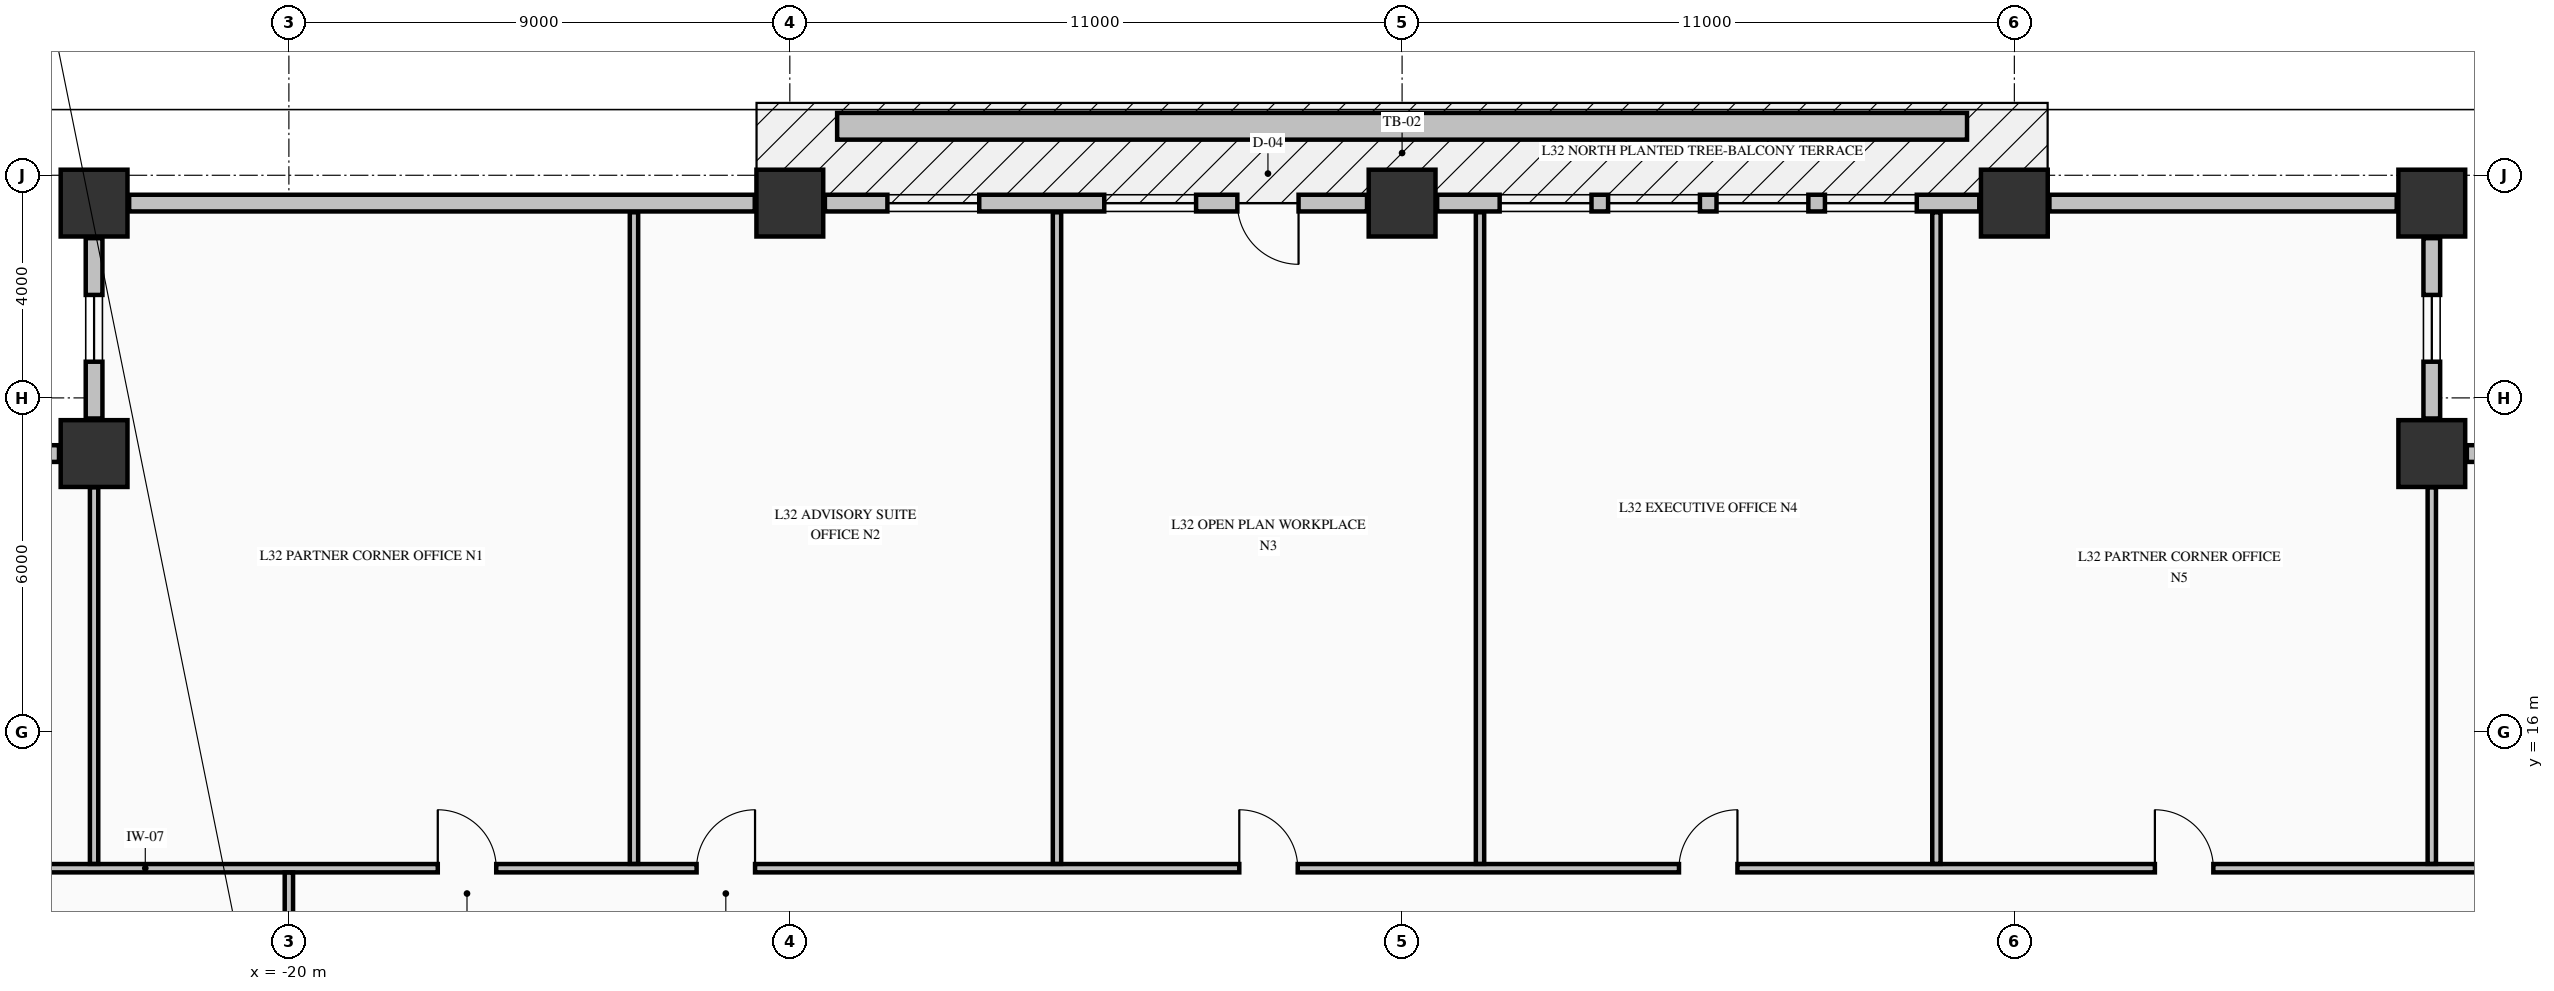
"""IFC4 building model, lengths in metres.
Left out: names, types, materials, properties, quantities, classifications, styles, units other than length and angle.
Written with IfcOpenShell. Run it as: python <this file> out.ifc"""

import sys

from ifc_helpers import new_model, si_unit, direction, frame, frame_2d, origin, origin_2d, place, context, subcontext, project, spatial, rectangle, extrude, element, fill, save


model = new_model("IFC4")
c1 = context("Model", 3, precision=1e-05, world=origin(), true_north=direction((0.0, 1.0)))
c2 = subcontext(c1, "Body", "Model", "MODEL_VIEW")
j1 = project(units=[si_unit("LENGTHUNIT", "METRE"), si_unit("PLANEANGLEUNIT", "RADIAN")], contexts=[c1])
p1 = place(None, origin())
s1 = spatial("IfcSite", under=j1, at=p1, CompositionType="ELEMENT")
p2 = place(p1, origin())
s2 = spatial("IfcBuilding", under=s1, at=p2, CompositionType="ELEMENT")
p3 = place(p2, frame((0.0, 0.0, 128.49)))
s3 = spatial("IfcBuildingStorey", under=s2, at=p3, CompositionType="ELEMENT", Elevation=128.49)
for number, where, z_axis, x_axis in (
    (1, (-23.5, 25.5, -0.25), (0.0, 0.0, 1.0), (1.0, 0.0, 0.0)),
    (2, (-11.0, 25.5, -0.25), (0.0, 0.0, 1.0), (1.0, 0.0, 0.0)),
    (3, (0.0, 25.5, -0.25), (0.0, 0.0, 1.0), (1.0, 0.0, 0.0)),
    (4, (11.0, 25.5, -0.25), (0.0, 0.0, 1.0), (1.0, 0.0, 0.0)),
    (5, (18.5, 25.5, -0.25), (0.0, 0.0, 1.0), (1.0, 0.0, 0.0)),
    (6, (18.5, 21.0, -0.25), (0.0, 0.0, 1.0), (1.0, 0.0, 0.0)),
    (7, (-23.5, 21.0, -0.25), (0.0, 0.0, 1.0), (1.0, 0.0, 0.0)),
):
    element("IfcColumn", number, at=place(p3, frame(where, z_axis=z_axis, x_axis=x_axis)), inside=s3, PredefinedType="COLUMN", context=c2, shape_type="SweptSolid", body=[
        extrude(rectangle(XDim=1.2, YDim=1.2, at=origin_2d()), origin(), (0.0, 0.0, 1.0), 3.57),
    ])
p4 = place(p3, frame((22.37, 21.0, 0.0), z_axis=(0.0, 0.0, 1.0), x_axis=(-1.0, 0.0, 0.0)))
e8 = element("IfcWall", 8, at=p4, inside=s3, PredefinedType="STANDARD", context=c2, shape_type="SweptSolid", body=[
    extrude(rectangle(XDim=3.24, YDim=0.3, at=frame_2d((1.62, 0.0))), origin(), (0.0, 0.0, 1.0), 2.712),
])
p5 = place(p4, frame((1.02, 0.0, 0.82)))
e9 = element("IfcOpeningElement", 9, at=p5, cuts=e8, PredefinedType="OPENING", context=c2, shape_type="SweptSolid", body=[
    extrude(rectangle(XDim=1.2, YDim=1.65, at=frame_2d((0.6, 0.825))), frame((0.0, 0.16, 0.0), z_axis=(0.0, -1.0, 0.0), x_axis=(1.0, 0.0, 0.0)), (0.0, 0.0, 1.0), 0.32),
])
p6 = place(p3, frame((18.5, 21.63, 0.0), z_axis=(0.0, 0.0, 1.0), x_axis=(0.0, 1.0, 0.0)))
e10 = element("IfcWall", 10, at=p6, inside=s3, PredefinedType="STANDARD", context=c2, shape_type="SweptSolid", body=[
    extrude(rectangle(XDim=3.24, YDim=0.3, at=frame_2d((1.62, 0.0))), origin(), (0.0, 0.0, 1.0), 2.712),
])
p7 = place(p6, frame((1.02, 0.0, 0.82)))
e11 = element("IfcOpeningElement", 11, at=p7, cuts=e10, PredefinedType="OPENING", context=c2, shape_type="SweptSolid", body=[
    extrude(rectangle(XDim=1.2, YDim=1.65, at=frame_2d((0.6, 0.825))), frame((0.0, 0.16, 0.0), z_axis=(0.0, -1.0, 0.0), x_axis=(1.0, 0.0, 0.0)), (0.0, 0.0, 1.0), 0.32),
])
p8 = place(p3, frame((-23.5, 24.87, 0.0), z_axis=(0.0, 0.0, 1.0), x_axis=(0.0, -1.0, 0.0)))
e12 = element("IfcWall", 12, at=p8, inside=s3, PredefinedType="STANDARD", context=c2, shape_type="SweptSolid", body=[
    extrude(rectangle(XDim=3.24, YDim=0.3, at=frame_2d((1.62, 0.0))), origin(), (0.0, 0.0, 1.0), 2.712),
])
p9 = place(p8, frame((1.02, 0.0, 0.82)))
e13 = element("IfcOpeningElement", 13, at=p9, cuts=e12, PredefinedType="OPENING", context=c2, shape_type="SweptSolid", body=[
    extrude(rectangle(XDim=1.2, YDim=1.65, at=frame_2d((0.6, 0.825))), frame((0.0, 0.16, 0.0), z_axis=(0.0, -1.0, 0.0), x_axis=(1.0, 0.0, 0.0)), (0.0, 0.0, 1.0), 0.32),
])
p10 = place(p3, frame((-24.13, 21.0, 0.0), z_axis=(0.0, 0.0, 1.0), x_axis=(-1.0, 0.0, 0.0)))
e14 = element("IfcWall", 14, at=p10, inside=s3, PredefinedType="STANDARD", context=c2, shape_type="SweptSolid", body=[
    extrude(rectangle(XDim=3.24, YDim=0.3, at=frame_2d((1.62, 0.0))), origin(), (0.0, 0.0, 1.0), 2.712),
])
p11 = place(p10, frame((1.02, 0.0, 0.82)))
e15 = element("IfcOpeningElement", 15, at=p11, cuts=e14, PredefinedType="OPENING", context=c2, shape_type="SweptSolid", body=[
    extrude(rectangle(XDim=1.2, YDim=1.65, at=frame_2d((0.6, 0.825))), frame((0.0, 0.16, 0.0), z_axis=(0.0, -1.0, 0.0), x_axis=(1.0, 0.0, 0.0)), (0.0, 0.0, 1.0), 0.32),
])
p12 = place(p3, frame((-11.63, 25.5, 0.0), z_axis=(0.0, 0.0, 1.0), x_axis=(-1.0, 0.0, 0.0)))
e16 = element("IfcWall", 16, at=p12, inside=s3, PredefinedType="STANDARD", context=c2, shape_type="SweptSolid", body=[
    extrude(rectangle(XDim=11.24, YDim=0.3, at=frame_2d((5.62, 0.0))), origin(), (0.0, 0.0, 1.0), 2.712),
])
p13 = place(p3, frame((-0.63, 25.5, 0.0), z_axis=(0.0, 0.0, 1.0), x_axis=(-1.0, 0.0, 0.0)))
e17 = element("IfcWall", 17, at=p13, inside=s3, PredefinedType="STANDARD", context=c2, shape_type="SweptSolid", body=[
    extrude(rectangle(XDim=9.74, YDim=0.3, at=frame_2d((4.87, 0.0))), origin(), (0.0, 0.0, 1.0), 2.712),
])
p14 = place(p13, frame((1.23, 0.0, 0.0)))
e18 = element("IfcOpeningElement", 18, at=p14, cuts=e17, PredefinedType="OPENING", context=c2, shape_type="SweptSolid", body=[
    extrude(rectangle(XDim=1.1, YDim=2.15, at=frame_2d((0.55, 1.075))), frame((0.0, 0.16, 0.0), z_axis=(0.0, -1.0, 0.0), x_axis=(1.0, 0.0, 0.0)), (0.0, 0.0, 1.0), 0.32),
])
p15 = place(p13, frame((3.071, 0.0, 0.8)))
e19 = element("IfcOpeningElement", 19, at=p15, cuts=e17, PredefinedType="OPENING", context=c2, shape_type="SweptSolid", body=[
    extrude(rectangle(XDim=1.65, YDim=1.7, at=frame_2d((0.825, 0.85))), frame((0.0, 0.16, 0.0), z_axis=(0.0, -1.0, 0.0), x_axis=(1.0, 0.0, 0.0)), (0.0, 0.0, 1.0), 0.32),
])
p16 = place(p13, frame((6.967, 0.0, 0.8)))
e20 = element("IfcOpeningElement", 20, at=p16, cuts=e17, PredefinedType="OPENING", context=c2, shape_type="SweptSolid", body=[
    extrude(rectangle(XDim=1.65, YDim=1.7, at=frame_2d((0.825, 0.85))), frame((0.0, 0.16, 0.0), z_axis=(0.0, -1.0, 0.0), x_axis=(1.0, 0.0, 0.0)), (0.0, 0.0, 1.0), 0.32),
])
p17 = place(p3, frame((10.37, 25.5, 0.0), z_axis=(0.0, 0.0, 1.0), x_axis=(-1.0, 0.0, 0.0)))
e21 = element("IfcWall", 21, at=p17, inside=s3, PredefinedType="STANDARD", context=c2, shape_type="SweptSolid", body=[
    extrude(rectangle(XDim=9.74, YDim=0.3, at=frame_2d((4.87, 0.0))), origin(), (0.0, 0.0, 1.0), 2.712),
])
p18 = place(p17, frame((1.123, 0.0, 0.8)))
e22 = element("IfcOpeningElement", 22, at=p18, cuts=e21, PredefinedType="OPENING", context=c2, shape_type="SweptSolid", body=[
    extrude(rectangle(XDim=1.65, YDim=1.7, at=frame_2d((0.825, 0.85))), frame((0.0, 0.16, 0.0), z_axis=(0.0, -1.0, 0.0), x_axis=(1.0, 0.0, 0.0)), (0.0, 0.0, 1.0), 0.32),
])
p19 = place(p17, frame((3.071, 0.0, 0.8)))
e23 = element("IfcOpeningElement", 23, at=p19, cuts=e21, PredefinedType="OPENING", context=c2, shape_type="SweptSolid", body=[
    extrude(rectangle(XDim=1.65, YDim=1.7, at=frame_2d((0.825, 0.85))), frame((0.0, 0.16, 0.0), z_axis=(0.0, -1.0, 0.0), x_axis=(1.0, 0.0, 0.0)), (0.0, 0.0, 1.0), 0.32),
])
p20 = place(p17, frame((5.019, 0.0, 0.8)))
e24 = element("IfcOpeningElement", 24, at=p20, cuts=e21, PredefinedType="OPENING", context=c2, shape_type="SweptSolid", body=[
    extrude(rectangle(XDim=1.65, YDim=1.7, at=frame_2d((0.825, 0.85))), frame((0.0, 0.16, 0.0), z_axis=(0.0, -1.0, 0.0), x_axis=(1.0, 0.0, 0.0)), (0.0, 0.0, 1.0), 0.32),
])
p21 = place(p17, frame((6.967, 0.0, 0.8)))
e25 = element("IfcOpeningElement", 25, at=p21, cuts=e21, PredefinedType="OPENING", context=c2, shape_type="SweptSolid", body=[
    extrude(rectangle(XDim=1.65, YDim=1.7, at=frame_2d((0.825, 0.85))), frame((0.0, 0.16, 0.0), z_axis=(0.0, -1.0, 0.0), x_axis=(1.0, 0.0, 0.0)), (0.0, 0.0, 1.0), 0.32),
])
p22 = place(p3, frame((17.87, 25.5, 0.0), z_axis=(0.0, 0.0, 1.0), x_axis=(-1.0, 0.0, 0.0)))
e26 = element("IfcWall", 26, at=p22, inside=s3, PredefinedType="STANDARD", context=c2, shape_type="SweptSolid", body=[
    extrude(rectangle(XDim=6.24, YDim=0.3, at=frame_2d((3.12, 0.0))), origin(), (0.0, 0.0, 1.0), 2.712),
])
p23 = place(p3, frame((-27.835, 13.55, 0.0), z_axis=(0.0, 0.0, 1.0), x_axis=(1.0, 0.0, 0.0)))
e27 = element("IfcWall", 27, at=p23, inside=s3, PredefinedType="PARTITIONING", context=c2, shape_type="SweptSolid", body=[
    extrude(rectangle(XDim=50.67, YDim=0.15, at=frame_2d((25.335, 0.0))), origin(), (0.0, 0.0, 1.0), 3.32),
])
p24 = place(p23, frame((10.51, 0.0, 0.0)))
e28 = element("IfcOpeningElement", 28, at=p24, cuts=e27, PredefinedType="OPENING", context=c2, shape_type="SweptSolid", body=[
    extrude(rectangle(XDim=1.05, YDim=2.15, at=frame_2d((0.525, 1.075))), frame((0.0, 0.085, 0.0), z_axis=(0.0, -1.0, 0.0), x_axis=(1.0, 0.0, 0.0)), (0.0, 0.0, 1.0), 0.17),
])
p25 = place(p23, frame((15.16, 0.0, 0.0)))
e29 = element("IfcOpeningElement", 29, at=p25, cuts=e27, PredefinedType="OPENING", context=c2, shape_type="SweptSolid", body=[
    extrude(rectangle(XDim=1.05, YDim=2.15, at=frame_2d((0.525, 1.075))), frame((0.0, 0.085, 0.0), z_axis=(0.0, -1.0, 0.0), x_axis=(1.0, 0.0, 0.0)), (0.0, 0.0, 1.0), 0.17),
])
p26 = place(p23, frame((24.91, 0.0, 0.0)))
e30 = element("IfcOpeningElement", 30, at=p26, cuts=e27, PredefinedType="OPENING", context=c2, shape_type="SweptSolid", body=[
    extrude(rectangle(XDim=1.05, YDim=2.15, at=frame_2d((0.525, 1.075))), frame((0.0, 0.085, 0.0), z_axis=(0.0, -1.0, 0.0), x_axis=(1.0, 0.0, 0.0)), (0.0, 0.0, 1.0), 0.17),
])
p27 = place(p23, frame((32.81, 0.0, 0.0)))
e31 = element("IfcOpeningElement", 31, at=p27, cuts=e27, PredefinedType="OPENING", context=c2, shape_type="SweptSolid", body=[
    extrude(rectangle(XDim=1.05, YDim=2.15, at=frame_2d((0.525, 1.075))), frame((0.0, 0.085, 0.0), z_axis=(0.0, -1.0, 0.0), x_axis=(1.0, 0.0, 0.0)), (0.0, 0.0, 1.0), 0.17),
])
p28 = place(p23, frame((41.36, 0.0, 0.0)))
e32 = element("IfcOpeningElement", 32, at=p28, cuts=e27, PredefinedType="OPENING", context=c2, shape_type="SweptSolid", body=[
    extrude(rectangle(XDim=1.05, YDim=2.15, at=frame_2d((0.525, 1.075))), frame((0.0, 0.085, 0.0), z_axis=(0.0, -1.0, 0.0), x_axis=(1.0, 0.0, 0.0)), (0.0, 0.0, 1.0), 0.17),
])
p29 = place(p3, frame((-23.5, 13.628, 0.0), z_axis=(0.0, 0.0, 1.0), x_axis=(0.0, 1.0, 0.0)))
e33 = element("IfcWall", 33, at=p29, inside=s3, PredefinedType="PARTITIONING", context=c2, shape_type="SweptSolid", body=[
    extrude(rectangle(XDim=6.766, YDim=0.15, at=frame_2d((3.383, 0.0))), origin(), (0.0, 0.0, 1.0), 3.32),
])
p30 = place(p3, frame((-20.0, 11.006, 0.0), z_axis=(0.0, 0.0, 1.0), x_axis=(0.0, 1.0, 0.0)))
e34 = element("IfcWall", 34, at=p30, inside=s3, PredefinedType="PARTITIONING", context=c2, shape_type="SweptSolid", body=[
    extrude(rectangle(XDim=2.466, YDim=0.15, at=frame_2d((1.233, 0.0))), origin(), (0.0, 0.0, 1.0), 2.81),
])
p31 = place(p30, frame((0.549, 0.0, 0.0)))
e35 = element("IfcOpeningElement", 35, at=p31, cuts=e34, PredefinedType="OPENING", context=c2, shape_type="SweptSolid", body=[
    extrude(rectangle(XDim=0.95, YDim=2.15, at=frame_2d((0.475, 1.075))), frame((0.0, 0.085, 0.0), z_axis=(0.0, -1.0, 0.0), x_axis=(1.0, 0.0, 0.0)), (0.0, 0.0, 1.0), 0.17),
])
for number, where, z_axis, x_axis in (
    (36, (-13.8, 13.628, 0.0), (0.0, 0.0, 1.0), (0.0, 1.0, 0.0)),
    (37, (-6.2, 13.628, 0.0), (0.0, 0.0, 1.0), (0.0, 1.0, 0.0)),
    (38, (1.4, 13.628, 0.0), (0.0, 0.0, 1.0), (0.0, 1.0, 0.0)),
    (39, (9.6, 13.628, 0.0), (0.0, 0.0, 1.0), (0.0, 1.0, 0.0)),
):
    element("IfcWall", number, at=place(p3, frame(where, z_axis=z_axis, x_axis=x_axis)), inside=s3, PredefinedType="PARTITIONING", context=c2, shape_type="SweptSolid", body=[
        extrude(rectangle(XDim=11.707, YDim=0.15, at=frame_2d((5.854, 0.0))), origin(), (0.0, 0.0, 1.0), 3.32),
    ])
p32 = place(p3, frame((18.5, 13.628, 0.0), z_axis=(0.0, 0.0, 1.0), x_axis=(0.0, 1.0, 0.0)))
e40 = element("IfcWall", 40, at=p32, inside=s3, PredefinedType="PARTITIONING", context=c2, shape_type="SweptSolid", body=[
    extrude(rectangle(XDim=6.766, YDim=0.15, at=frame_2d((3.383, 0.0))), origin(), (0.0, 0.0, 1.0), 3.32),
])
p33 = place(p3, frame((-10.15, 26.88, -0.04), z_axis=(0.0, 0.0, 1.0), x_axis=(1.0, 0.0, 0.0)))
e41 = element("IfcWall", 41, at=p33, inside=s3, PredefinedType="PARAPET", context=c2, shape_type="SweptSolid", body=[
    extrude(rectangle(XDim=20.3, YDim=0.48, at=frame_2d((10.15, 0.0))), origin(), (0.0, 0.0, 1.0), 0.52),
])
p34 = place(p7, origin())
e42 = element("IfcWindow", 42, at=p34, inside=s3, PartitioningType="SINGLE_PANEL", PredefinedType="WINDOW", context=c2, shape_type="SweptSolid", body=[
    extrude(rectangle(XDim=1.2, YDim=1.65, at=frame_2d((0.6, 0.825))), frame((0.0, 0.03, 0.0), z_axis=(0.0, -1.0, 0.0), x_axis=(1.0, 0.0, 0.0)), (0.0, 0.0, 1.0), 0.06),
])
fill(e11, e42)
p35 = place(p9, origin())
e43 = element("IfcWindow", 43, at=p35, inside=s3, PartitioningType="SINGLE_PANEL", PredefinedType="WINDOW", context=c2, shape_type="SweptSolid", body=[
    extrude(rectangle(XDim=1.2, YDim=1.65, at=frame_2d((0.6, 0.825))), frame((0.0, 0.03, 0.0), z_axis=(0.0, -1.0, 0.0), x_axis=(1.0, 0.0, 0.0)), (0.0, 0.0, 1.0), 0.06),
])
fill(e13, e43)
p36 = place(p14, origin())
e44 = element("IfcDoor", 44, at=p36, inside=s3, OperationType="SINGLE_SWING_LEFT", PredefinedType="DOOR", context=c2, shape_type="SweptSolid", body=[
    extrude(rectangle(XDim=1.1, YDim=2.15, at=frame_2d((0.55, 1.075))), frame((0.0, 0.025, 0.0), z_axis=(0.0, -1.0, 0.0), x_axis=(1.0, 0.0, 0.0)), (0.0, 0.0, 1.0), 0.05),
])
fill(e18, e44)
p37 = place(p15, origin())
e45 = element("IfcWindow", 45, at=p37, inside=s3, PartitioningType="SINGLE_PANEL", PredefinedType="WINDOW", context=c2, shape_type="SweptSolid", body=[
    extrude(rectangle(XDim=1.65, YDim=1.7, at=frame_2d((0.825, 0.85))), frame((0.0, 0.03, 0.0), z_axis=(0.0, -1.0, 0.0), x_axis=(1.0, 0.0, 0.0)), (0.0, 0.0, 1.0), 0.06),
])
fill(e19, e45)
p38 = place(p16, origin())
e46 = element("IfcWindow", 46, at=p38, inside=s3, PartitioningType="SINGLE_PANEL", PredefinedType="WINDOW", context=c2, shape_type="SweptSolid", body=[
    extrude(rectangle(XDim=1.65, YDim=1.7, at=frame_2d((0.825, 0.85))), frame((0.0, 0.03, 0.0), z_axis=(0.0, -1.0, 0.0), x_axis=(1.0, 0.0, 0.0)), (0.0, 0.0, 1.0), 0.06),
])
fill(e20, e46)
p39 = place(p18, origin())
e47 = element("IfcWindow", 47, at=p39, inside=s3, PartitioningType="SINGLE_PANEL", PredefinedType="WINDOW", context=c2, shape_type="SweptSolid", body=[
    extrude(rectangle(XDim=1.65, YDim=1.7, at=frame_2d((0.825, 0.85))), frame((0.0, 0.03, 0.0), z_axis=(0.0, -1.0, 0.0), x_axis=(1.0, 0.0, 0.0)), (0.0, 0.0, 1.0), 0.06),
])
fill(e22, e47)
p40 = place(p19, origin())
e48 = element("IfcWindow", 48, at=p40, inside=s3, PartitioningType="SINGLE_PANEL", PredefinedType="WINDOW", context=c2, shape_type="SweptSolid", body=[
    extrude(rectangle(XDim=1.65, YDim=1.7, at=frame_2d((0.825, 0.85))), frame((0.0, 0.03, 0.0), z_axis=(0.0, -1.0, 0.0), x_axis=(1.0, 0.0, 0.0)), (0.0, 0.0, 1.0), 0.06),
])
fill(e23, e48)
p41 = place(p20, origin())
e49 = element("IfcWindow", 49, at=p41, inside=s3, PartitioningType="SINGLE_PANEL", PredefinedType="WINDOW", context=c2, shape_type="SweptSolid", body=[
    extrude(rectangle(XDim=1.65, YDim=1.7, at=frame_2d((0.825, 0.85))), frame((0.0, 0.03, 0.0), z_axis=(0.0, -1.0, 0.0), x_axis=(1.0, 0.0, 0.0)), (0.0, 0.0, 1.0), 0.06),
])
fill(e24, e49)
p42 = place(p21, origin())
e50 = element("IfcWindow", 50, at=p42, inside=s3, PartitioningType="SINGLE_PANEL", PredefinedType="WINDOW", context=c2, shape_type="SweptSolid", body=[
    extrude(rectangle(XDim=1.65, YDim=1.7, at=frame_2d((0.825, 0.85))), frame((0.0, 0.03, 0.0), z_axis=(0.0, -1.0, 0.0), x_axis=(1.0, 0.0, 0.0)), (0.0, 0.0, 1.0), 0.06),
])
fill(e25, e50)
p43 = place(p24, origin())
e51 = element("IfcDoor", 51, at=p43, inside=s3, OperationType="SINGLE_SWING_LEFT", PredefinedType="DOOR", context=c2, shape_type="SweptSolid", body=[
    extrude(rectangle(XDim=1.05, YDim=2.15, at=frame_2d((0.525, 1.075))), frame((0.0, 0.025, 0.0), z_axis=(0.0, -1.0, 0.0), x_axis=(1.0, 0.0, 0.0)), (0.0, 0.0, 1.0), 0.05),
])
fill(e28, e51)
p44 = place(p25, origin())
e52 = element("IfcDoor", 52, at=p44, inside=s3, OperationType="SINGLE_SWING_RIGHT", PredefinedType="DOOR", context=c2, shape_type="SweptSolid", body=[
    extrude(rectangle(XDim=1.05, YDim=2.15, at=frame_2d((0.525, 1.075))), frame((0.0, 0.025, 0.0), z_axis=(0.0, -1.0, 0.0), x_axis=(1.0, 0.0, 0.0)), (0.0, 0.0, 1.0), 0.05),
])
fill(e29, e52)
p45 = place(p26, origin())
e53 = element("IfcDoor", 53, at=p45, inside=s3, OperationType="SINGLE_SWING_LEFT", PredefinedType="DOOR", context=c2, shape_type="SweptSolid", body=[
    extrude(rectangle(XDim=1.05, YDim=2.15, at=frame_2d((0.525, 1.075))), frame((0.0, 0.025, 0.0), z_axis=(0.0, -1.0, 0.0), x_axis=(1.0, 0.0, 0.0)), (0.0, 0.0, 1.0), 0.05),
])
fill(e30, e53)
p46 = place(p27, origin())
e54 = element("IfcDoor", 54, at=p46, inside=s3, OperationType="SINGLE_SWING_RIGHT", PredefinedType="DOOR", context=c2, shape_type="SweptSolid", body=[
    extrude(rectangle(XDim=1.05, YDim=2.15, at=frame_2d((0.525, 1.075))), frame((0.0, 0.025, 0.0), z_axis=(0.0, -1.0, 0.0), x_axis=(1.0, 0.0, 0.0)), (0.0, 0.0, 1.0), 0.05),
])
fill(e31, e54)
p47 = place(p28, origin())
e55 = element("IfcDoor", 55, at=p47, inside=s3, OperationType="SINGLE_SWING_LEFT", PredefinedType="DOOR", context=c2, shape_type="SweptSolid", body=[
    extrude(rectangle(XDim=1.05, YDim=2.15, at=frame_2d((0.525, 1.075))), frame((0.0, 0.025, 0.0), z_axis=(0.0, -1.0, 0.0), x_axis=(1.0, 0.0, 0.0)), (0.0, 0.0, 1.0), 0.05),
])
fill(e32, e55)
save(model, sys.argv[1])
